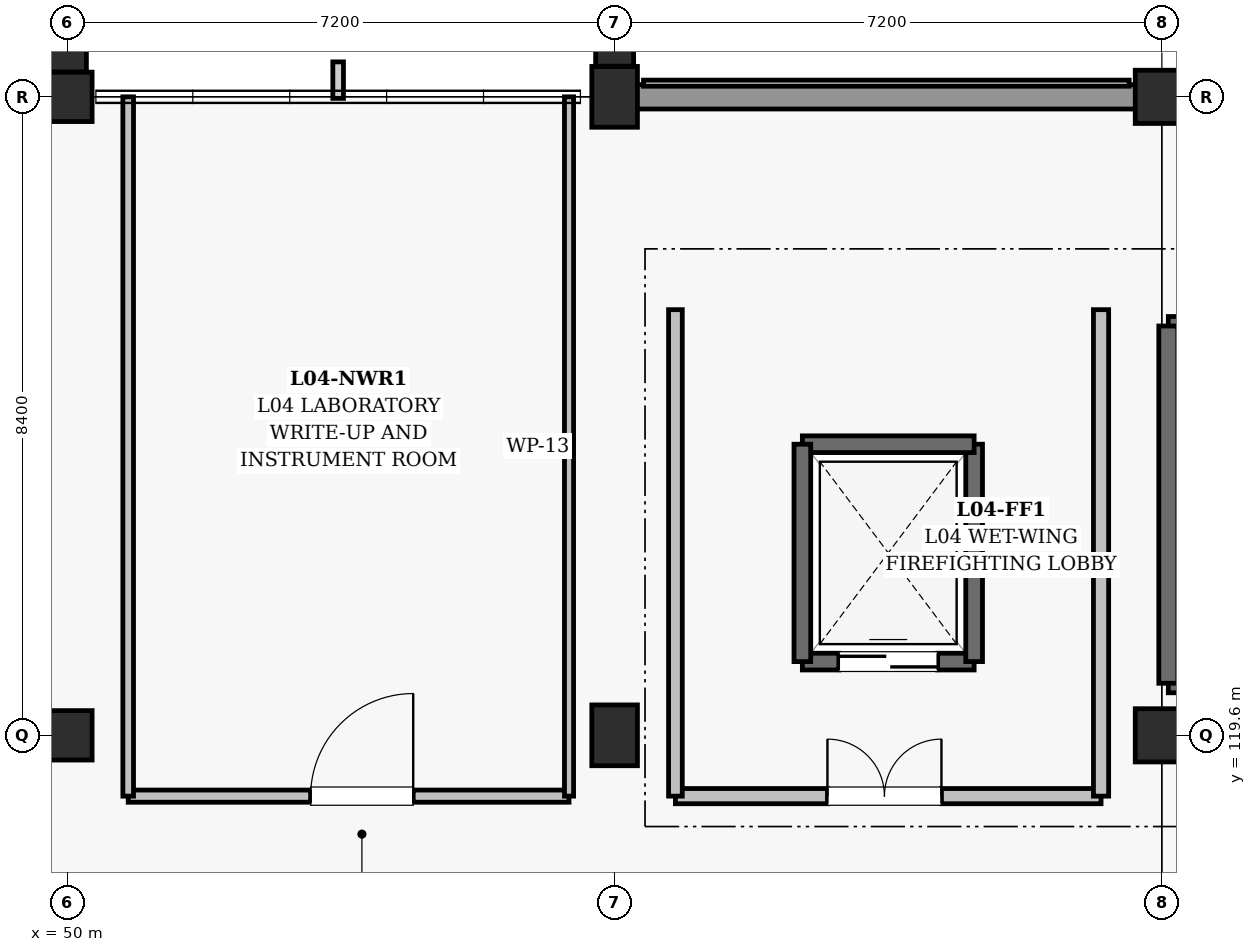
"""IFC4 building model, lengths in metres.
Left out: names, types, materials, properties, quantities, classifications, styles, units other than length and angle.
Written with IfcOpenShell. Run it as: python <this file> out.ifc"""

import sys

from ifc_helpers import new_model, si_unit, direction, frame, frame_2d, origin, origin_2d, place, context, subcontext, project, spatial, rectangle, extrude, element, fill, save


model = new_model("IFC4")
c1 = context("Model", 3, precision=1e-05, world=origin(), true_north=direction((0.0, 1.0)))
c2 = subcontext(c1, "Body", "Model", "MODEL_VIEW")
j1 = project(units=[si_unit("LENGTHUNIT", "METRE"), si_unit("PLANEANGLEUNIT", "RADIAN")], contexts=[c1])
p1 = place(None, origin())
s1 = spatial("IfcSite", under=j1, at=p1, CompositionType="ELEMENT")
p2 = place(p1, origin())
s2 = spatial("IfcBuilding", under=s1, at=p2, CompositionType="ELEMENT")
p3 = place(p2, frame((0.0, 0.0, 18.9)))
s3 = spatial("IfcBuildingStorey", under=s2, at=p3, CompositionType="ELEMENT", Elevation=18.9)
for number, where, z_axis, x_axis in (
    (1, (50.0, 119.6, 0.0), (0.0, 0.0, 1.0), (1.0, 0.0, 0.0)),
    (2, (50.0, 128.0, 0.0), (0.0, 0.0, 1.0), (1.0, 0.0, 0.0)),
):
    element("IfcColumn", number, at=place(p3, frame(where, z_axis=z_axis, x_axis=x_axis)), inside=s3, PredefinedType="COLUMN", context=c2, shape_type="SweptSolid", body=[
        extrude(rectangle(XDim=0.65, YDim=0.65, at=origin_2d()), origin(), (0.0, 0.0, 1.0), 4.5),
    ])
for number, where, z_axis, x_axis in (
    (3, (57.2, 119.6, 0.0), (0.0, 0.0, 1.0), (1.0, 0.0, 0.0)),
    (4, (57.2, 128.0, 0.0), (0.0, 0.0, 1.0), (1.0, 0.0, 0.0)),
):
    element("IfcColumn", number, at=place(p3, frame(where, z_axis=z_axis, x_axis=x_axis)), inside=s3, PredefinedType="COLUMN", context=c2, shape_type="SweptSolid", body=[
        extrude(rectangle(XDim=0.6, YDim=0.8, at=origin_2d()), origin(), (0.0, 0.0, 1.0), 4.5),
    ])
for number, where, z_axis, x_axis in (
    (5, (64.4, 119.6, 0.0), (0.0, 0.0, 1.0), (1.0, 0.0, 0.0)),
    (6, (64.4, 128.0, 0.0), (0.0, 0.0, 1.0), (1.0, 0.0, 0.0)),
):
    element("IfcColumn", number, at=place(p3, frame(where, z_axis=z_axis, x_axis=x_axis)), inside=s3, PredefinedType="COLUMN", context=c2, shape_type="SweptSolid", body=[
        extrude(rectangle(XDim=0.7, YDim=0.7, at=origin_2d()), origin(), (0.0, 0.0, 1.0), 4.5),
    ])
for number, where, z_axis, x_axis in (
    (7, (50.0, 128.703, 0.0), (0.0, 0.0, 1.0), (1.0, 0.0, 0.0)),
    (8, (57.2, 128.778, 0.0), (0.0, 0.0, 1.0), (1.0, 0.0, 0.0)),
):
    element("IfcColumn", number, at=place(p3, frame(where, z_axis=z_axis, x_axis=x_axis)), inside=s3, PredefinedType="PILASTER", context=c2, shape_type="SweptSolid", body=[
        extrude(rectangle(XDim=0.5, YDim=0.75, at=origin_2d()), origin(), (0.0, 0.0, 1.0), 4.5),
    ])
p4 = place(p3, frame((57.48, 128.0, 0.0), z_axis=(0.0, 0.0, 1.0), x_axis=(1.0, 0.0, 0.0)))
e9 = element("IfcWall", 9, at=p4, inside=s3, PredefinedType="SOLIDWALL", context=c2, shape_type="SweptSolid", body=[
    extrude(rectangle(XDim=6.59, YDim=0.32, at=frame_2d((3.295, 0.0))), origin(), (0.0, 0.0, 1.0), 3.305),
])
p5 = place(p3, frame((64.485, 120.285, 0.0), z_axis=(0.0, 0.0, 1.0), x_axis=(1.0, 0.0, 0.0)))
e10 = element("IfcWall", 10, at=p5, inside=s3, PredefinedType="SHEAR", context=c2, shape_type="SweptSolid", body=[
    extrude(rectangle(XDim=10.63, YDim=0.25, at=frame_2d((5.315, 0.0))), origin(), (0.0, 0.0, 1.0), 4.175),
])
p6 = place(p5, frame((0.55, 0.0, 0.0)))
e11 = element("IfcOpeningElement", 11, at=p6, cuts=e10, PredefinedType="OPENING", context=c2, shape_type="SweptSolid", body=[
    extrude(rectangle(XDim=1.2, YDim=2.15, at=frame_2d((0.6, 1.075))), frame((0.0, 0.135, 0.0), z_axis=(0.0, -1.0, 0.0), x_axis=(1.0, 0.0, 0.0)), (0.0, 0.0, 1.0), 0.27),
])
p7 = place(p3, frame((75.115, 124.985, 0.0), z_axis=(0.0, 0.0, 1.0), x_axis=(-1.0, 0.0, 0.0)))
e12 = element("IfcWall", 12, at=p7, inside=s3, PredefinedType="SHEAR", context=c2, shape_type="SweptSolid", body=[
    extrude(rectangle(XDim=10.63, YDim=0.25, at=frame_2d((5.315, 0.0))), origin(), (0.0, 0.0, 1.0), 4.175),
])
p8 = place(p3, frame((64.485, 124.985, 0.0), z_axis=(0.0, 0.0, 1.0), x_axis=(0.0, -1.0, 0.0)))
e13 = element("IfcWall", 13, at=p8, inside=s3, PredefinedType="SHEAR", context=c2, shape_type="SweptSolid", body=[
    extrude(rectangle(XDim=4.7, YDim=0.25, at=frame_2d((2.35, 0.0))), origin(), (0.0, 0.0, 1.0), 4.175),
])
p9 = place(p3, frame((59.67, 120.57, 0.0), z_axis=(0.0, 0.0, 1.0), x_axis=(1.0, 0.0, 0.0)))
e14 = element("IfcWall", 14, at=p9, inside=s3, PredefinedType="SHEAR", context=c2, shape_type="SweptSolid", body=[
    extrude(rectangle(XDim=2.26, YDim=0.22, at=frame_2d((1.13, 0.0))), origin(), (0.0, 0.0, 1.0), 4.175),
])
p10 = place(p9, frame((0.48, 0.0, 0.0)))
e15 = element("IfcOpeningElement", 15, at=p10, cuts=e14, PredefinedType="OPENING", context=c2, shape_type="SweptSolid", body=[
    extrude(rectangle(XDim=1.3, YDim=2.2, at=frame_2d((0.65, 1.1))), frame((0.0, 0.12, 0.0), z_axis=(0.0, -1.0, 0.0), x_axis=(1.0, 0.0, 0.0)), (0.0, 0.0, 1.0), 0.24),
])
p11 = place(p3, frame((61.93, 120.57, 0.0), z_axis=(0.0, 0.0, 1.0), x_axis=(0.0, 1.0, 0.0)))
e16 = element("IfcWall", 16, at=p11, inside=s3, PredefinedType="SHEAR", context=c2, shape_type="SweptSolid", body=[
    extrude(rectangle(XDim=2.86, YDim=0.22, at=frame_2d((1.43, 0.0))), origin(), (0.0, 0.0, 1.0), 4.175),
])
p12 = place(p3, frame((61.93, 123.43, 0.0), z_axis=(0.0, 0.0, 1.0), x_axis=(-1.0, 0.0, 0.0)))
e17 = element("IfcWall", 17, at=p12, inside=s3, PredefinedType="SHEAR", context=c2, shape_type="SweptSolid", body=[
    extrude(rectangle(XDim=2.26, YDim=0.22, at=frame_2d((1.13, 0.0))), origin(), (0.0, 0.0, 1.0), 4.175),
])
p13 = place(p3, frame((59.67, 123.43, 0.0), z_axis=(0.0, 0.0, 1.0), x_axis=(0.0, -1.0, 0.0)))
e18 = element("IfcWall", 18, at=p13, inside=s3, PredefinedType="SHEAR", context=c2, shape_type="SweptSolid", body=[
    extrude(rectangle(XDim=2.86, YDim=0.22, at=frame_2d((1.43, 0.0))), origin(), (0.0, 0.0, 1.0), 4.175),
])
p14 = place(p3, frame((58.0, 118.8, 0.0), z_axis=(0.0, 0.0, 1.0), x_axis=(1.0, 0.0, 0.0)))
e19 = element("IfcWall", 19, at=p14, inside=s3, PredefinedType="SOLIDWALL", context=c2, shape_type="SweptSolid", body=[
    extrude(rectangle(XDim=5.6, YDim=0.2, at=frame_2d((2.8, 0.0))), origin(), (0.0, 0.0, 1.0), 3.54),
])
p15 = place(p14, frame((2.0, 0.0, 0.0)))
e20 = element("IfcOpeningElement", 20, at=p15, cuts=e19, PredefinedType="OPENING", context=c2, shape_type="SweptSolid", body=[
    extrude(rectangle(XDim=1.5, YDim=2.2, at=frame_2d((0.75, 1.1))), frame((0.0, 0.11, 0.0), z_axis=(0.0, -1.0, 0.0), x_axis=(1.0, 0.0, 0.0)), (0.0, 0.0, 1.0), 0.22),
])
p16 = place(p3, frame((58.0, 118.8, 0.0), z_axis=(0.0, 0.0, 1.0), x_axis=(0.0, 1.0, 0.0)))
e21 = element("IfcWall", 21, at=p16, inside=s3, PredefinedType="SOLIDWALL", context=c2, shape_type="SweptSolid", body=[
    extrude(rectangle(XDim=6.4, YDim=0.18, at=frame_2d((3.2, 0.0))), origin(), (0.0, 0.0, 1.0), 3.36),
])
p17 = place(p3, frame((63.6, 118.8, 0.0), z_axis=(0.0, 0.0, 1.0), x_axis=(0.0, 1.0, 0.0)))
e22 = element("IfcWall", 22, at=p17, inside=s3, PredefinedType="SOLIDWALL", context=c2, shape_type="SweptSolid", body=[
    extrude(rectangle(XDim=6.4, YDim=0.2, at=frame_2d((3.2, 0.0))), origin(), (0.0, 0.0, 1.0), 3.36),
])
p18 = place(p3, frame((50.8, 118.8, 0.0), z_axis=(0.0, 0.0, 1.0), x_axis=(1.0, 0.0, 0.0)))
e23 = element("IfcWall", 23, at=p18, inside=s3, PredefinedType="PARTITIONING", context=c2, shape_type="SweptSolid", body=[
    extrude(rectangle(XDim=5.8, YDim=0.16, at=frame_2d((2.9, 0.0))), origin(), (0.0, 0.0, 1.0), 3.54),
])
p19 = place(p18, frame((2.4, 0.0, 0.0)))
e24 = element("IfcOpeningElement", 24, at=p19, cuts=e23, PredefinedType="OPENING", context=c2, shape_type="SweptSolid", body=[
    extrude(rectangle(XDim=1.35, YDim=2.2, at=frame_2d((0.675, 1.1))), frame((0.0, 0.09, 0.0), z_axis=(0.0, -1.0, 0.0), x_axis=(1.0, 0.0, 0.0)), (0.0, 0.0, 1.0), 0.18),
])
p20 = place(p3, frame((50.8, 118.8, 0.0), z_axis=(0.0, 0.0, 1.0), x_axis=(0.0, 1.0, 0.0)))
e25 = element("IfcWall", 25, at=p20, inside=s3, PredefinedType="PARTITIONING", context=c2, shape_type="SweptSolid", body=[
    extrude(rectangle(XDim=9.2, YDim=0.14, at=frame_2d((4.6, 0.0))), origin(), (0.0, 0.0, 1.0), 3.41),
])
p21 = place(p3, frame((56.6, 118.8, 0.0), z_axis=(0.0, 0.0, 1.0), x_axis=(0.0, 1.0, 0.0)))
e26 = element("IfcWall", 26, at=p21, inside=s3, PredefinedType="PARTITIONING", context=c2, shape_type="SweptSolid", body=[
    extrude(rectangle(XDim=9.2, YDim=0.12, at=frame_2d((4.6, 0.0))), origin(), (0.0, 0.0, 1.0), 3.41),
])
p22 = place(p10, origin())
e27 = element("IfcDoor", 27, at=p22, inside=s3, OperationType="DOUBLE_DOOR_SLIDING", PredefinedType="DOOR", context=c2, shape_type="SweptSolid", body=[
    extrude(rectangle(XDim=1.3, YDim=2.2, at=frame_2d((0.65, 1.1))), frame((0.0, 0.025, 0.0), z_axis=(0.0, -1.0, 0.0), x_axis=(1.0, 0.0, 0.0)), (0.0, 0.0, 1.0), 0.05),
])
fill(e15, e27)
p23 = place(p15, origin())
e28 = element("IfcDoor", 28, at=p23, inside=s3, OperationType="DOUBLE_DOOR_SINGLE_SWING", PredefinedType="DOOR", context=c2, shape_type="SweptSolid", body=[
    extrude(rectangle(XDim=1.5, YDim=2.2, at=frame_2d((0.75, 1.1))), frame((0.0, 0.025, 0.0), z_axis=(0.0, -1.0, 0.0), x_axis=(1.0, 0.0, 0.0)), (0.0, 0.0, 1.0), 0.05),
])
fill(e20, e28)
p24 = place(p19, origin())
e29 = element("IfcDoor", 29, at=p24, inside=s3, OperationType="SINGLE_SWING_RIGHT", PredefinedType="DOOR", context=c2, shape_type="SweptSolid", body=[
    extrude(rectangle(XDim=1.35, YDim=2.2, at=frame_2d((0.675, 1.1))), frame((0.0, 0.025, 0.0), z_axis=(0.0, -1.0, 0.0), x_axis=(1.0, 0.0, 0.0)), (0.0, 0.0, 1.0), 0.05),
])
fill(e24, e29)
save(model, sys.argv[1])
